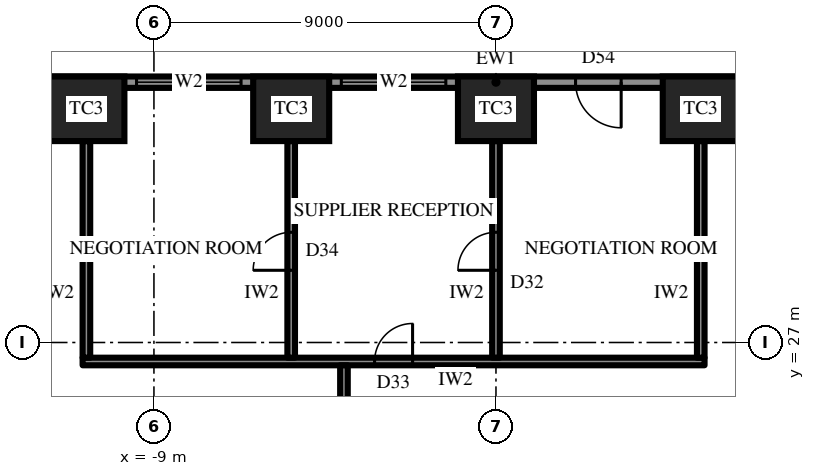
"""IFC4 building model, lengths in metres.
Left out: names, types, materials, properties, quantities, classifications, styles, units other than length and angle.
Written with IfcOpenShell. Run it as: python <this file> out.ifc"""

import sys

from ifc_helpers import new_model, si_unit, direction, frame, frame_2d, origin, origin_2d, place, context, subcontext, project, spatial, rectangle, extrude, element, fill, save


model = new_model("IFC4")
c1 = context("Model", 3, precision=1e-05, world=origin(), true_north=direction((0.0, 1.0)))
c2 = subcontext(c1, "Body", "Model", "MODEL_VIEW")
j1 = project(units=[si_unit("LENGTHUNIT", "METRE"), si_unit("PLANEANGLEUNIT", "RADIAN")], contexts=[c1])
p1 = place(None, origin())
s1 = spatial("IfcSite", under=j1, at=p1, CompositionType="ELEMENT")
p2 = place(p1, origin())
s2 = spatial("IfcBuilding", under=s1, at=p2, CompositionType="ELEMENT")
p3 = place(p2, frame((0.0, 0.0, 73.9)))
s3 = spatial("IfcBuildingStorey", under=s2, at=p3, CompositionType="ELEMENT", Elevation=73.9)
for number, where, z_axis, x_axis in (
    (1, (5.389, 33.15, 0.0), (0.0, 0.0, 1.0), (-1.0, 0.0, 0.0)),
    (2, (0.0, 33.15, 0.0), (0.0, 0.0, 1.0), (-1.0, 0.0, 0.0)),
    (3, (-5.389, 33.15, 0.0), (0.0, 0.0, 1.0), (-1.0, 0.0, 0.0)),
    (4, (-10.777, 33.15, 0.0), (0.0, 0.0, 1.0), (-1.0, 0.0, 0.0)),
):
    element("IfcColumn", number, at=place(p3, frame(where, z_axis=z_axis, x_axis=x_axis)), inside=s3, PredefinedType="COLUMN", context=c2, shape_type="SweptSolid", body=[
        extrude(rectangle(XDim=2.0, YDim=1.7, at=origin_2d()), origin(), (0.0, 0.0, 1.0), 4.2),
    ])
p4 = place(p3, frame((16.166, 33.85, 0.0), z_axis=(0.0, 0.0, 1.0), x_axis=(-1.0, 0.0, 0.0)))
e5 = element("IfcWall", 5, at=p4, inside=s3, PredefinedType="SOLIDWALL", context=c2, shape_type="SweptSolid", body=[
    extrude(rectangle(XDim=32.332, YDim=0.3, at=frame_2d((16.166, 0.0))), origin(), (0.0, 0.0, 1.0), 2.7),
])
p5 = place(p4, frame((1.319, 0.0, 0.6)))
e6 = element("IfcOpeningElement", 6, at=p5, cuts=e5, PredefinedType="OPENING", context=c2, shape_type="SweptSolid", body=[
    extrude(rectangle(XDim=2.75, YDim=1.85, at=frame_2d((1.375, 0.925))), frame((0.0, 0.16, 0.0), z_axis=(0.0, -1.0, 0.0), x_axis=(1.0, 0.0, 0.0)), (0.0, 0.0, 1.0), 0.32),
])
p6 = place(p4, frame((6.708, 0.0, 0.6)))
e7 = element("IfcOpeningElement", 7, at=p6, cuts=e5, PredefinedType="OPENING", context=c2, shape_type="SweptSolid", body=[
    extrude(rectangle(XDim=2.75, YDim=1.85, at=frame_2d((1.375, 0.925))), frame((0.0, 0.16, 0.0), z_axis=(0.0, -1.0, 0.0), x_axis=(1.0, 0.0, 0.0)), (0.0, 0.0, 1.0), 0.32),
])
p7 = place(p4, frame((12.872, 0.0, 0.0)))
e8 = element("IfcOpeningElement", 8, at=p7, cuts=e5, PredefinedType="OPENING", context=c2, shape_type="SweptSolid", body=[
    extrude(rectangle(XDim=1.2, YDim=2.4, at=frame_2d((0.6, 1.2))), frame((0.0, 0.16, 0.0), z_axis=(0.0, -1.0, 0.0), x_axis=(1.0, 0.0, 0.0)), (0.0, 0.0, 1.0), 0.32),
])
p8 = place(p4, frame((17.485, 0.0, 0.6)))
e9 = element("IfcOpeningElement", 9, at=p8, cuts=e5, PredefinedType="OPENING", context=c2, shape_type="SweptSolid", body=[
    extrude(rectangle(XDim=2.75, YDim=1.85, at=frame_2d((1.375, 0.925))), frame((0.0, 0.16, 0.0), z_axis=(0.0, -1.0, 0.0), x_axis=(1.0, 0.0, 0.0)), (0.0, 0.0, 1.0), 0.32),
])
p9 = place(p4, frame((22.874, 0.0, 0.6)))
e10 = element("IfcOpeningElement", 10, at=p9, cuts=e5, PredefinedType="OPENING", context=c2, shape_type="SweptSolid", body=[
    extrude(rectangle(XDim=2.75, YDim=1.85, at=frame_2d((1.375, 0.925))), frame((0.0, 0.16, 0.0), z_axis=(0.0, -1.0, 0.0), x_axis=(1.0, 0.0, 0.0)), (0.0, 0.0, 1.0), 0.32),
])
p10 = place(p4, frame((28.262, 0.0, 0.6)))
e11 = element("IfcOpeningElement", 11, at=p10, cuts=e5, PredefinedType="OPENING", context=c2, shape_type="SweptSolid", body=[
    extrude(rectangle(XDim=2.75, YDim=1.85, at=frame_2d((1.375, 0.925))), frame((0.0, 0.16, 0.0), z_axis=(0.0, -1.0, 0.0), x_axis=(1.0, 0.0, 0.0)), (0.0, 0.0, 1.0), 0.32),
])
p11 = place(p3, frame((5.489, 26.5, 0.0), z_axis=(0.0, 0.0, 1.0), x_axis=(-1.0, 0.0, 0.0)))
e12 = element("IfcWall", 12, at=p11, inside=s3, PredefinedType="PARTITIONING", context=c2, shape_type="SweptSolid", body=[
    extrude(rectangle(XDim=16.366, YDim=0.2, at=frame_2d((8.183, 0.0))), origin(), (0.0, 0.0, 1.0), 4.0),
])
p12 = place(p11, frame((7.683, 0.0, 0.0)))
e13 = element("IfcOpeningElement", 13, at=p12, cuts=e12, PredefinedType="OPENING", context=c2, shape_type="SweptSolid", body=[
    extrude(rectangle(XDim=1.0, YDim=2.2, at=frame_2d((0.5, 1.1))), frame((0.0, 0.11, 0.0), z_axis=(0.0, -1.0, 0.0), x_axis=(1.0, 0.0, 0.0)), (0.0, 0.0, 1.0), 0.22),
])
p13 = place(p3, frame((5.389, 26.6, 0.0), z_axis=(0.0, 0.0, 1.0), x_axis=(0.0, 1.0, 0.0)))
e14 = element("IfcWall", 14, at=p13, inside=s3, PredefinedType="PARTITIONING", context=c2, shape_type="SweptSolid", body=[
    extrude(rectangle(XDim=5.7, YDim=0.2, at=frame_2d((2.85, 0.0))), origin(), (0.0, 0.0, 1.0), 2.944),
])
p14 = place(p3, frame((0.0, 26.6, 0.0), z_axis=(0.0, 0.0, 1.0), x_axis=(0.0, 1.0, 0.0)))
e15 = element("IfcWall", 15, at=p14, inside=s3, PredefinedType="PARTITIONING", context=c2, shape_type="SweptSolid", body=[
    extrude(rectangle(XDim=5.7, YDim=0.2, at=frame_2d((2.85, 0.0))), origin(), (0.0, 0.0, 1.0), 2.944),
])
p15 = place(p14, frame((2.3, 0.0, 0.0)))
e16 = element("IfcOpeningElement", 16, at=p15, cuts=e15, PredefinedType="OPENING", context=c2, shape_type="SweptSolid", body=[
    extrude(rectangle(XDim=1.0, YDim=2.2, at=frame_2d((0.5, 1.1))), frame((0.0, 0.11, 0.0), z_axis=(0.0, -1.0, 0.0), x_axis=(1.0, 0.0, 0.0)), (0.0, 0.0, 1.0), 0.22),
])
p16 = place(p3, frame((-5.389, 26.6, 0.0), z_axis=(0.0, 0.0, 1.0), x_axis=(0.0, 1.0, 0.0)))
e17 = element("IfcWall", 17, at=p16, inside=s3, PredefinedType="PARTITIONING", context=c2, shape_type="SweptSolid", body=[
    extrude(rectangle(XDim=5.7, YDim=0.2, at=frame_2d((2.85, 0.0))), origin(), (0.0, 0.0, 1.0), 2.944),
])
p17 = place(p16, frame((2.3, 0.0, 0.0)))
e18 = element("IfcOpeningElement", 18, at=p17, cuts=e17, PredefinedType="OPENING", context=c2, shape_type="SweptSolid", body=[
    extrude(rectangle(XDim=1.0, YDim=2.2, at=frame_2d((0.5, 1.1))), frame((0.0, 0.11, 0.0), z_axis=(0.0, -1.0, 0.0), x_axis=(1.0, 0.0, 0.0)), (0.0, 0.0, 1.0), 0.22),
])
p18 = place(p3, frame((-10.777, 26.6, 0.0), z_axis=(0.0, 0.0, 1.0), x_axis=(0.0, 1.0, 0.0)))
e19 = element("IfcWall", 19, at=p18, inside=s3, PredefinedType="PARTITIONING", context=c2, shape_type="SweptSolid", body=[
    extrude(rectangle(XDim=5.7, YDim=0.2, at=frame_2d((2.85, 0.0))), origin(), (0.0, 0.0, 1.0), 2.944),
])
p19 = place(p3, frame((-4.0, 14.2, 0.0), z_axis=(0.0, 0.0, 1.0), x_axis=(0.0, 1.0, 0.0)))
e20 = element("IfcWall", 20, at=p19, inside=s3, PredefinedType="PARTITIONING", context=c2, shape_type="SweptSolid", body=[
    extrude(rectangle(XDim=12.2, YDim=0.2, at=frame_2d((6.1, 0.0))), origin(), (0.0, 0.0, 1.0), 4.0),
])
p20 = place(p19, frame((0.72, 0.0, 0.0)))
e21 = element("IfcOpeningElement", 21, at=p20, cuts=e20, PredefinedType="OPENING", context=c2, shape_type="SweptSolid", body=[
    extrude(rectangle(XDim=1.0, YDim=2.2, at=frame_2d((0.5, 1.1))), frame((0.0, 0.11, 0.0), z_axis=(0.0, -1.0, 0.0), x_axis=(1.0, 0.0, 0.0)), (0.0, 0.0, 1.0), 0.22),
])
p21 = place(p7, origin())
e22 = element("IfcDoor", 22, at=p21, inside=s3, OperationType="SINGLE_SWING_RIGHT", PredefinedType="DOOR", context=c2, shape_type="SweptSolid", body=[
    extrude(rectangle(XDim=1.2, YDim=2.4, at=frame_2d((0.6, 1.2))), frame((0.0, 0.025, 0.0), z_axis=(0.0, -1.0, 0.0), x_axis=(1.0, 0.0, 0.0)), (0.0, 0.0, 1.0), 0.05),
])
fill(e8, e22)
p22 = place(p8, origin())
e23 = element("IfcWindow", 23, at=p22, inside=s3, PartitioningType="SINGLE_PANEL", PredefinedType="WINDOW", context=c2, shape_type="SweptSolid", body=[
    extrude(rectangle(XDim=2.75, YDim=1.85, at=frame_2d((1.375, 0.925))), frame((0.0, 0.03, 0.0), z_axis=(0.0, -1.0, 0.0), x_axis=(1.0, 0.0, 0.0)), (0.0, 0.0, 1.0), 0.06),
])
fill(e9, e23)
p23 = place(p9, origin())
e24 = element("IfcWindow", 24, at=p23, inside=s3, PartitioningType="SINGLE_PANEL", PredefinedType="WINDOW", context=c2, shape_type="SweptSolid", body=[
    extrude(rectangle(XDim=2.75, YDim=1.85, at=frame_2d((1.375, 0.925))), frame((0.0, 0.03, 0.0), z_axis=(0.0, -1.0, 0.0), x_axis=(1.0, 0.0, 0.0)), (0.0, 0.0, 1.0), 0.06),
])
fill(e10, e24)
p24 = place(p15, origin())
e25 = element("IfcDoor", 25, at=p24, inside=s3, OperationType="SINGLE_SWING_RIGHT", PredefinedType="DOOR", context=c2, shape_type="SweptSolid", body=[
    extrude(rectangle(XDim=1.0, YDim=2.2, at=frame_2d((0.5, 1.1))), frame((0.0, 0.025, 0.0), z_axis=(0.0, -1.0, 0.0), x_axis=(1.0, 0.0, 0.0)), (0.0, 0.0, 1.0), 0.05),
])
fill(e16, e25)
p25 = place(p12, frame((1.0, 0.0, 0.0), z_axis=(0.0, 0.0, 1.0), x_axis=(-1.0, 0.0, 0.0)))
e26 = element("IfcDoor", 26, at=p25, inside=s3, OperationType="SINGLE_SWING_LEFT", PredefinedType="DOOR", context=c2, shape_type="SweptSolid", body=[
    extrude(rectangle(XDim=1.0, YDim=2.2, at=frame_2d((0.5, 1.1))), frame((0.0, 0.025, 0.0), z_axis=(0.0, -1.0, 0.0), x_axis=(1.0, 0.0, 0.0)), (0.0, 0.0, 1.0), 0.05),
])
fill(e13, e26)
p26 = place(p17, origin())
e27 = element("IfcDoor", 27, at=p26, inside=s3, OperationType="SINGLE_SWING_RIGHT", PredefinedType="DOOR", context=c2, shape_type="SweptSolid", body=[
    extrude(rectangle(XDim=1.0, YDim=2.2, at=frame_2d((0.5, 1.1))), frame((0.0, 0.025, 0.0), z_axis=(0.0, -1.0, 0.0), x_axis=(1.0, 0.0, 0.0)), (0.0, 0.0, 1.0), 0.05),
])
fill(e18, e27)
save(model, sys.argv[1])
